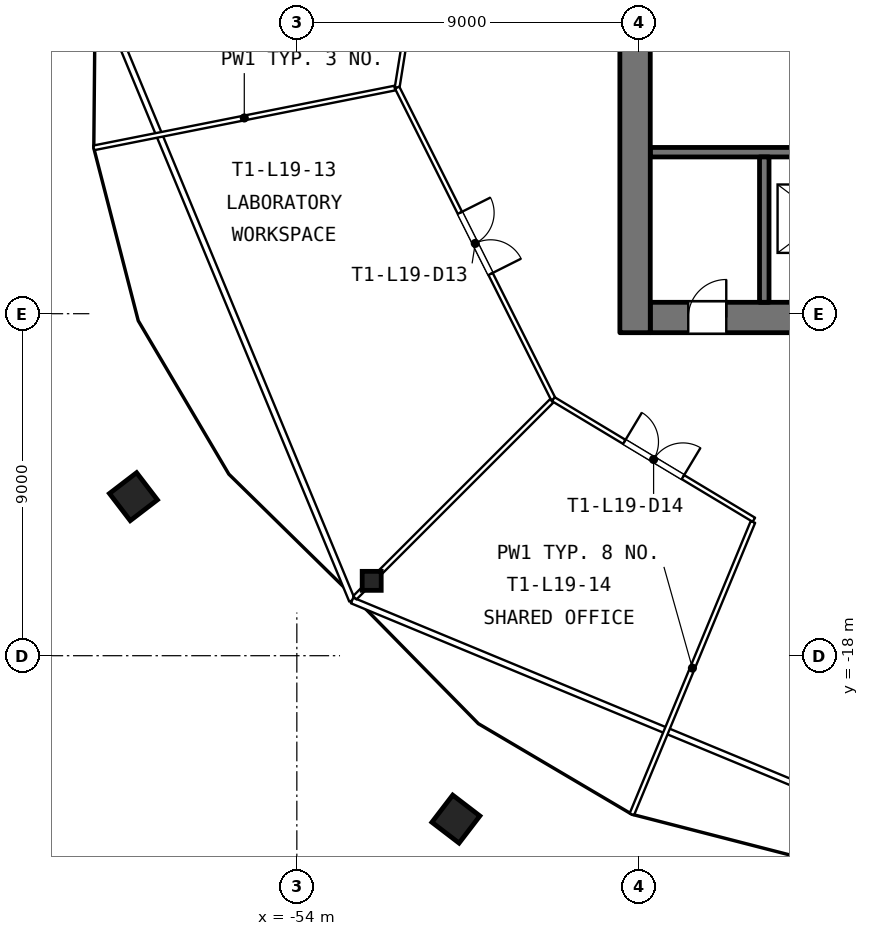
"""IFC4 building model, lengths in metres.
Left out: names, types, materials, properties, quantities, classifications, styles, units other than length and angle.
Written with IfcOpenShell. Run it as: python <this file> out.ifc"""

import sys

from ifc_helpers import new_model, si_unit, direction, frame, frame_2d, origin, origin_2d, place, context, subcontext, project, spatial, rectangle, hollow_rectangle, extrude, element, fill, save


model = new_model("IFC4")
c1 = context("Model", 3, precision=1e-05, world=origin(), true_north=direction((0.0, 1.0)))
c2 = subcontext(c1, "Body", "Model", "MODEL_VIEW")
j1 = project(units=[si_unit("LENGTHUNIT", "METRE"), si_unit("PLANEANGLEUNIT", "RADIAN")], contexts=[c1])
p1 = place(None, origin())
s1 = spatial("IfcSite", under=j1, at=p1, CompositionType="ELEMENT")
p2 = place(p1, origin())
s2 = spatial("IfcBuilding", under=s1, at=p2, CompositionType="ELEMENT")
p3 = place(p2, frame((0.0, 0.0, 84.0)))
s3 = spatial("IfcBuildingStorey", under=s2, at=p3, CompositionType="ELEMENT", Elevation=84.0)
p4 = place(p3, frame((-52.03, -16.03, 0.0), z_axis=(0.0, 0.0, 1.0), x_axis=(1.0, 0.0, 0.0)))
e1 = element("IfcColumn", 1, at=p4, inside=s3, PredefinedType="COLUMN", context=c2, shape_type="SweptSolid", body=[
    extrude(hollow_rectangle(XDim=0.5, YDim=0.5, WallThickness=0.03, at=origin_2d()), origin(), (0.0, 0.0, 1.0), 3.9),
])
p5 = place(p3, frame((-44.7, -9.1, 0.0), z_axis=(0.0, 0.0, 1.0), x_axis=(1.0, 0.0, 0.0)))
e2 = element("IfcWall", 2, at=p5, inside=s3, PredefinedType="SHEAR", context=c2, shape_type="SweptSolid", body=[
    extrude(rectangle(XDim=17.4, YDim=0.8, at=frame_2d((8.7, 0.0))), origin(), (0.0, 0.0, 1.0), 3.6),
])
p6 = place(p5, frame((7.3, 0.0, 0.0)))
e3 = element("IfcOpeningElement", 3, at=p6, cuts=e2, PredefinedType="OPENING", context=c2, shape_type="SweptSolid", body=[
    extrude(rectangle(XDim=1.2, YDim=2.1, at=frame_2d((0.6, 1.05))), frame((0.0, 0.41, 0.0), z_axis=(0.0, -1.0, 0.0), x_axis=(1.0, 0.0, 0.0)), (0.0, 0.0, 1.0), 0.82),
])
p7 = place(p5, frame((1.0, 0.0, 0.0)))
e4 = element("IfcOpeningElement", 4, at=p7, cuts=e2, PredefinedType="OPENING", context=c2, shape_type="SweptSolid", body=[
    extrude(rectangle(XDim=1.0, YDim=2.1, at=frame_2d((0.5, 1.05))), frame((0.0, 0.41, 0.0), z_axis=(0.0, -1.0, 0.0), x_axis=(1.0, 0.0, 0.0)), (0.0, 0.0, 1.0), 0.82),
])
p8 = place(p3, frame((-44.7, -4.75, 0.0), z_axis=(0.0, 0.0, 1.0), x_axis=(1.0, 0.0, 0.0)))
e5 = element("IfcWall", 5, at=p8, inside=s3, PredefinedType="SHEAR", context=c2, shape_type="SweptSolid", body=[
    extrude(rectangle(XDim=17.4, YDim=0.25, at=frame_2d((8.7, 0.0))), origin(), (0.0, 0.0, 1.0), 3.6),
])
p9 = place(p3, frame((-45.1, -9.5, 0.0), z_axis=(0.0, 0.0, 1.0), x_axis=(0.0, 1.0, 0.0)))
e6 = element("IfcWall", 6, at=p9, inside=s3, PredefinedType="SHEAR", context=c2, shape_type="SweptSolid", body=[
    extrude(rectangle(XDim=19.0, YDim=0.8, at=frame_2d((9.5, 0.0))), origin(), (0.0, 0.0, 1.0), 3.6),
])
p10 = place(p9, frame((8.3, 0.0, 0.0)))
e7 = element("IfcOpeningElement", 7, at=p10, cuts=e6, PredefinedType="OPENING", context=c2, shape_type="SweptSolid", body=[
    extrude(rectangle(XDim=2.4, YDim=2.1, at=frame_2d((1.2, 1.05))), frame((0.0, 0.41, 0.0), z_axis=(0.0, -1.0, 0.0), x_axis=(1.0, 0.0, 0.0)), (0.0, 0.0, 1.0), 0.82),
])
p11 = place(p3, frame((-41.7, -8.7, 0.0), z_axis=(0.0, 0.0, 1.0), x_axis=(0.0, 1.0, 0.0)))
e8 = element("IfcWall", 8, at=p11, inside=s3, PredefinedType="SHEAR", context=c2, shape_type="SweptSolid", body=[
    extrude(rectangle(XDim=3.825, YDim=0.25, at=frame_2d((1.913, 0.0))), origin(), (0.0, 0.0, 1.0), 3.6),
])
p12 = place(p3, frame((-59.344, -4.636, 0.0), z_axis=(0.0, 0.0, 1.0), x_axis=(0.980844858088, 0.194790565382, 0.0)))
e9 = element("IfcWall", 9, at=p12, inside=s3, PredefinedType="PARTITIONING", context=c2, shape_type="SweptSolid", body=[
    extrude(rectangle(XDim=8.077, YDim=0.125, at=frame_2d((4.038, 0.0))), origin(), (0.0, 0.0, 1.0), 2.4),
])
p13 = place(p3, frame((-52.475, -16.475, 0.0), z_axis=(0.0, 0.0, 1.0), x_axis=(0.707106781187, 0.707106781187, 0.0)))
e10 = element("IfcWall", 10, at=p13, inside=s3, PredefinedType="PARTITIONING", context=c2, shape_type="SweptSolid", body=[
    extrude(rectangle(XDim=7.327, YDim=0.125, at=frame_2d((3.663, 0.0))), origin(), (0.0, 0.0, 1.0), 2.4),
])
p14 = place(p3, frame((-45.184, -22.173, 0.0), z_axis=(0.0, 0.0, 1.0), x_axis=(0.3826720415, 0.92388425068, 0.0)))
e11 = element("IfcWall", 11, at=p14, inside=s3, PredefinedType="PARTITIONING", context=c2, shape_type="SweptSolid", body=[
    extrude(rectangle(XDim=8.326, YDim=0.125, at=frame_2d((4.163, 0.0))), origin(), (0.0, 0.0, 1.0), 2.4),
])
p15 = place(p3, frame((-49.434, 8.983, 0.0), z_axis=(0.0, 0.0, 1.0), x_axis=(-0.158089733584, -0.987424749606, 0.0)))
e12 = element("IfcWall", 12, at=p15, inside=s3, PredefinedType="PARTITIONING", context=c2, shape_type="SweptSolid", body=[
    extrude(rectangle(XDim=12.186, YDim=0.125, at=frame_2d((6.093, 0.0))), origin(), (0.0, 0.0, 1.0), 3.0),
])
p16 = place(p15, frame((5.193, 0.0, 0.0)))
e13 = element("IfcOpeningElement", 13, at=p16, cuts=e12, PredefinedType="OPENING", context=c2, shape_type="SweptSolid", body=[
    extrude(rectangle(XDim=1.8, YDim=2.1, at=frame_2d((0.9, 1.05))), frame((0.0, 0.073, 0.0), z_axis=(0.0, -1.0, 0.0), x_axis=(1.0, 0.0, 0.0)), (0.0, 0.0, 1.0), 0.145),
])
p17 = place(p3, frame((-51.361, -3.05, 0.0), z_axis=(0.0, 0.0, 1.0), x_axis=(0.448150268207, -0.893958241254, 0.0)))
e14 = element("IfcWall", 14, at=p17, inside=s3, PredefinedType="PARTITIONING", context=c2, shape_type="SweptSolid", body=[
    extrude(rectangle(XDim=9.172, YDim=0.125, at=frame_2d((4.586, 0.0))), origin(), (0.0, 0.0, 1.0), 3.0),
])
p18 = place(p17, frame((3.686, 0.0, 0.0)))
e15 = element("IfcOpeningElement", 15, at=p18, cuts=e14, PredefinedType="OPENING", context=c2, shape_type="SweptSolid", body=[
    extrude(rectangle(XDim=1.8, YDim=2.1, at=frame_2d((0.9, 1.05))), frame((0.0, 0.073, 0.0), z_axis=(0.0, -1.0, 0.0), x_axis=(1.0, 0.0, 0.0)), (0.0, 0.0, 1.0), 0.145),
])
p19 = place(p3, frame((-47.25, -11.25, 0.0), z_axis=(0.0, 0.0, 1.0), x_axis=(0.856985133989, -0.515341129856, 0.0)))
e16 = element("IfcWall", 16, at=p19, inside=s3, PredefinedType="PARTITIONING", context=c2, shape_type="SweptSolid", body=[
    extrude(rectangle(XDim=6.156, YDim=0.125, at=frame_2d((3.078, 0.0))), origin(), (0.0, 0.0, 1.0), 3.0),
])
p20 = place(p19, frame((2.178, 0.0, 0.0)))
e17 = element("IfcOpeningElement", 17, at=p20, cuts=e16, PredefinedType="OPENING", context=c2, shape_type="SweptSolid", body=[
    extrude(rectangle(XDim=1.8, YDim=2.1, at=frame_2d((0.9, 1.05))), frame((0.0, 0.073, 0.0), z_axis=(0.0, -1.0, 0.0), x_axis=(1.0, 0.0, 0.0)), (0.0, 0.0, 1.0), 0.145),
])
p21 = place(p7, origin())
e18 = element("IfcDoor", 18, at=p21, inside=s3, OperationType="SINGLE_SWING_RIGHT", PredefinedType="DOOR", context=c2, shape_type="SweptSolid", body=[
    extrude(rectangle(XDim=1.0, YDim=2.1, at=frame_2d((0.5, 1.05))), frame((0.0, 0.275, 0.0), z_axis=(0.0, -1.0, 0.0), x_axis=(1.0, 0.0, 0.0)), (0.0, 0.0, 1.0), 0.05),
])
fill(e4, e18)
p22 = place(p18, origin())
e19 = element("IfcDoor", 19, at=p22, inside=s3, OperationType="DOUBLE_DOOR_DOUBLE_SWING", PredefinedType="DOOR", context=c2, shape_type="SweptSolid", body=[
    extrude(rectangle(XDim=1.8, YDim=2.1, at=frame_2d((0.9, 1.05))), frame((0.0, 0.025, 0.0), z_axis=(0.0, -1.0, 0.0), x_axis=(1.0, 0.0, 0.0)), (0.0, 0.0, 1.0), 0.05),
])
fill(e15, e19)
p23 = place(p20, origin())
e20 = element("IfcDoor", 20, at=p23, inside=s3, OperationType="DOUBLE_DOOR_DOUBLE_SWING", PredefinedType="DOOR", context=c2, shape_type="SweptSolid", body=[
    extrude(rectangle(XDim=1.8, YDim=2.1, at=frame_2d((0.9, 1.05))), frame((0.0, 0.025, 0.0), z_axis=(0.0, -1.0, 0.0), x_axis=(1.0, 0.0, 0.0)), (0.0, 0.0, 1.0), 0.05),
])
fill(e17, e20)
save(model, sys.argv[1])
